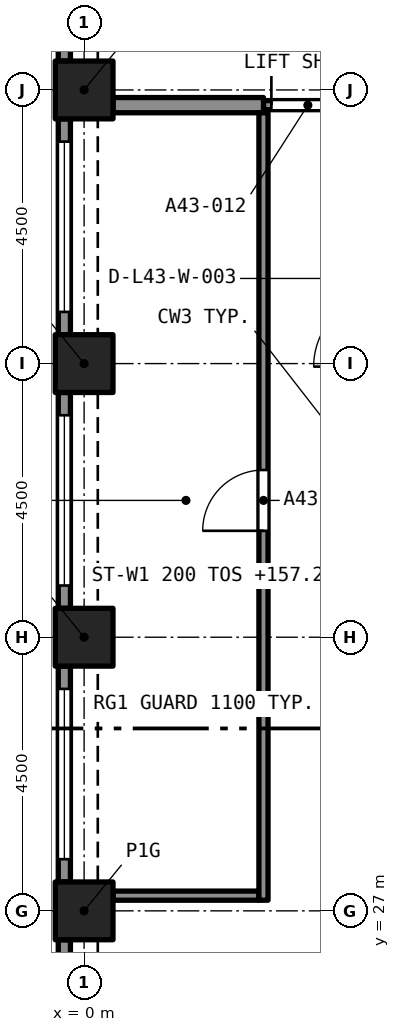
"""IFC4 building model, lengths in metres.
Left out: names, types, materials, properties, quantities, classifications, styles, units other than length and angle.
Written with IfcOpenShell. Run it as: python <this file> out.ifc"""

import sys

from ifc_helpers import new_model, si_unit, direction, frame, frame_2d, origin, origin_2d, place, context, subcontext, project, spatial, rectangle, extrude, element, fill, save


model = new_model("IFC4")
c1 = context("Model", 3, precision=1e-05, world=origin(), true_north=direction((0.0, 1.0)))
c2 = subcontext(c1, "Body", "Model", "MODEL_VIEW")
j1 = project(units=[si_unit("LENGTHUNIT", "METRE"), si_unit("PLANEANGLEUNIT", "RADIAN")], contexts=[c1])
p1 = place(None, origin())
s1 = spatial("IfcSite", under=j1, at=p1, CompositionType="ELEMENT")
p2 = place(p1, origin())
s2 = spatial("IfcBuilding", under=s1, at=p2, CompositionType="ELEMENT")
p3 = place(p2, frame((0.0, 0.0, 155.0)))
s3 = spatial("IfcBuildingStorey", under=s2, at=p3, CompositionType="ELEMENT", Elevation=155.0)
for number, where, z_axis, x_axis in (
    (1, (0.0, 27.0, 0.0), (0.0, 0.0, 1.0), (1.0, 0.0, 0.0)),
    (2, (0.0, 31.5, 0.0), (0.0, 0.0, 1.0), (1.0, 0.0, 0.0)),
    (3, (0.0, 36.0, 0.0), (0.0, 0.0, 1.0), (1.0, 0.0, 0.0)),
    (4, (0.0, 40.5, 0.0), (0.0, 0.0, 1.0), (1.0, 0.0, 0.0)),
):
    element("IfcColumn", number, at=place(p3, frame(where, z_axis=z_axis, x_axis=x_axis)), inside=s3, PredefinedType="COLUMN", context=c2, shape_type="SweptSolid", body=[
        extrude(rectangle(XDim=0.95, YDim=0.95, at=origin_2d()), origin(), (0.0, 0.0, 1.0), 4.4),
    ])
p4 = place(p3, frame((-0.325, 40.975, 0.0), z_axis=(0.0, 0.0, 1.0), x_axis=(0.0, 1.0, 0.0)))
e5 = element("IfcWall", 5, at=p4, inside=s3, PredefinedType="SOLIDWALL", context=c2, shape_type="SweptSolid", body=[
    extrude(rectangle(XDim=3.55, YDim=0.2, at=frame_2d((1.775, 0.0))), origin(), (0.0, 0.0, 1.0), 4.4),
])
p5 = place(p4, frame((0.375, 0.0, 0.45)))
e6 = element("IfcOpeningElement", 6, at=p5, cuts=e5, PredefinedType="OPENING", context=c2, shape_type="SweptSolid", body=[
    extrude(rectangle(XDim=2.8, YDim=2.55, at=frame_2d((1.4, 1.275))), frame((0.0, 0.11, 0.0), z_axis=(0.0, -1.0, 0.0), x_axis=(1.0, 0.0, 0.0)), (0.0, 0.0, 1.0), 0.22),
])
p6 = place(p3, frame((-0.325, 36.475, 0.0), z_axis=(0.0, 0.0, 1.0), x_axis=(0.0, 1.0, 0.0)))
e7 = element("IfcWall", 7, at=p6, inside=s3, PredefinedType="SOLIDWALL", context=c2, shape_type="SweptSolid", body=[
    extrude(rectangle(XDim=3.55, YDim=0.2, at=frame_2d((1.775, 0.0))), origin(), (0.0, 0.0, 1.0), 4.4),
])
p7 = place(p6, frame((0.375, 0.0, 0.45)))
e8 = element("IfcOpeningElement", 8, at=p7, cuts=e7, PredefinedType="OPENING", context=c2, shape_type="SweptSolid", body=[
    extrude(rectangle(XDim=2.8, YDim=2.55, at=frame_2d((1.4, 1.275))), frame((0.0, 0.11, 0.0), z_axis=(0.0, -1.0, 0.0), x_axis=(1.0, 0.0, 0.0)), (0.0, 0.0, 1.0), 0.22),
])
p8 = place(p3, frame((-0.325, 31.975, 0.0), z_axis=(0.0, 0.0, 1.0), x_axis=(0.0, 1.0, 0.0)))
e9 = element("IfcWall", 9, at=p8, inside=s3, PredefinedType="SOLIDWALL", context=c2, shape_type="SweptSolid", body=[
    extrude(rectangle(XDim=3.55, YDim=0.2, at=frame_2d((1.775, 0.0))), origin(), (0.0, 0.0, 1.0), 4.4),
])
p9 = place(p8, frame((0.375, 0.0, 0.45)))
e10 = element("IfcOpeningElement", 10, at=p9, cuts=e9, PredefinedType="OPENING", context=c2, shape_type="SweptSolid", body=[
    extrude(rectangle(XDim=2.8, YDim=2.55, at=frame_2d((1.4, 1.275))), frame((0.0, 0.11, 0.0), z_axis=(0.0, -1.0, 0.0), x_axis=(1.0, 0.0, 0.0)), (0.0, 0.0, 1.0), 0.22),
])
p10 = place(p3, frame((-0.325, 27.475, 0.0), z_axis=(0.0, 0.0, 1.0), x_axis=(0.0, 1.0, 0.0)))
e11 = element("IfcWall", 11, at=p10, inside=s3, PredefinedType="SOLIDWALL", context=c2, shape_type="SweptSolid", body=[
    extrude(rectangle(XDim=3.55, YDim=0.2, at=frame_2d((1.775, 0.0))), origin(), (0.0, 0.0, 1.0), 4.4),
])
p11 = place(p10, frame((0.375, 0.0, 0.45)))
e12 = element("IfcOpeningElement", 12, at=p11, cuts=e11, PredefinedType="OPENING", context=c2, shape_type="SweptSolid", body=[
    extrude(rectangle(XDim=2.8, YDim=2.55, at=frame_2d((1.4, 1.275))), frame((0.0, 0.11, 0.0), z_axis=(0.0, -1.0, 0.0), x_axis=(1.0, 0.0, 0.0)), (0.0, 0.0, 1.0), 0.22),
])
p12 = place(p3, frame((-0.325, 22.975, 0.0), z_axis=(0.0, 0.0, 1.0), x_axis=(0.0, 1.0, 0.0)))
e13 = element("IfcWall", 13, at=p12, inside=s3, PredefinedType="SOLIDWALL", context=c2, shape_type="SweptSolid", body=[
    extrude(rectangle(XDim=3.55, YDim=0.2, at=frame_2d((1.775, 0.0))), origin(), (0.0, 0.0, 1.0), 4.4),
])
p13 = place(p12, frame((0.375, 0.0, 0.45)))
e14 = element("IfcOpeningElement", 14, at=p13, cuts=e13, PredefinedType="OPENING", context=c2, shape_type="SweptSolid", body=[
    extrude(rectangle(XDim=2.8, YDim=2.55, at=frame_2d((1.4, 1.275))), frame((0.0, 0.11, 0.0), z_axis=(0.0, -1.0, 0.0), x_axis=(1.0, 0.0, 0.0)), (0.0, 0.0, 1.0), 0.22),
])
p14 = place(p3, frame((2.95, 40.25, 0.0), z_axis=(0.0, 0.0, 1.0), x_axis=(1.0, 0.0, 0.0)))
e15 = element("IfcWall", 15, at=p14, inside=s3, PredefinedType="PARTITIONING", context=c2, shape_type="SweptSolid", body=[
    extrude(rectangle(XDim=1.8, YDim=0.15, at=frame_2d((0.9, 0.0))), origin(), (0.0, 0.0, 1.0), 4.1),
])
p15 = place(p14, frame((0.13, 0.0, 0.0)))
e16 = element("IfcOpeningElement", 16, at=p15, cuts=e15, PredefinedType="OPENING", context=c2, shape_type="SweptSolid", body=[
    extrude(rectangle(XDim=1.2, YDim=2.4, at=frame_2d((0.6, 1.2))), frame((0.0, 0.085, 0.0), z_axis=(0.0, -1.0, 0.0), x_axis=(1.0, 0.0, 0.0)), (0.0, 0.0, 1.0), 0.17),
])
p16 = place(p3, frame((0.475, 40.25, 0.0), z_axis=(0.0, 0.0, 1.0), x_axis=(1.0, 0.0, 0.0)))
e17 = element("IfcWall", 17, at=p16, inside=s3, PredefinedType="PARTITIONING", context=c2, shape_type="SweptSolid", body=[
    extrude(rectangle(XDim=2.475, YDim=0.25, at=frame_2d((1.237, 0.0))), origin(), (0.0, 0.0, 1.0), 4.1),
])
p17 = place(p3, frame((0.475, 27.25, 0.0), z_axis=(0.0, 0.0, 1.0), x_axis=(1.0, 0.0, 0.0)))
e18 = element("IfcWall", 18, at=p17, inside=s3, PredefinedType="PARTITIONING", context=c2, shape_type="SweptSolid", body=[
    extrude(rectangle(XDim=2.4, YDim=0.15, at=frame_2d((1.2, 0.0))), origin(), (0.0, 0.0, 1.0), 4.1),
])
p18 = place(p3, frame((2.95, 27.175, 0.0), z_axis=(0.0, 0.0, 1.0), x_axis=(0.0, 1.0, 0.0)))
e19 = element("IfcWall", 19, at=p18, inside=s3, PredefinedType="PARTITIONING", context=c2, shape_type="SweptSolid", body=[
    extrude(rectangle(XDim=12.95, YDim=0.15, at=frame_2d((6.475, 0.0))), origin(), (0.0, 0.0, 1.0), 4.1),
])
p19 = place(p18, frame((6.075, 0.0, 0.0)))
e20 = element("IfcOpeningElement", 20, at=p19, cuts=e19, PredefinedType="OPENING", context=c2, shape_type="SweptSolid", body=[
    extrude(rectangle(XDim=1.0, YDim=2.1, at=frame_2d((0.5, 1.05))), frame((0.0, 0.085, 0.0), z_axis=(0.0, -1.0, 0.0), x_axis=(1.0, 0.0, 0.0)), (0.0, 0.0, 1.0), 0.17),
])
p20 = place(p7, origin())
e21 = element("IfcWindow", 21, at=p20, inside=s3, PartitioningType="SINGLE_PANEL", PredefinedType="WINDOW", context=c2, shape_type="SweptSolid", body=[
    extrude(rectangle(XDim=2.8, YDim=2.55, at=frame_2d((1.4, 1.275))), frame((0.0, 0.03, 0.0), z_axis=(0.0, -1.0, 0.0), x_axis=(1.0, 0.0, 0.0)), (0.0, 0.0, 1.0), 0.06),
])
fill(e8, e21)
p21 = place(p9, origin())
e22 = element("IfcWindow", 22, at=p21, inside=s3, PartitioningType="SINGLE_PANEL", PredefinedType="WINDOW", context=c2, shape_type="SweptSolid", body=[
    extrude(rectangle(XDim=2.8, YDim=2.55, at=frame_2d((1.4, 1.275))), frame((0.0, 0.03, 0.0), z_axis=(0.0, -1.0, 0.0), x_axis=(1.0, 0.0, 0.0)), (0.0, 0.0, 1.0), 0.06),
])
fill(e10, e22)
p22 = place(p11, origin())
e23 = element("IfcWindow", 23, at=p22, inside=s3, PartitioningType="SINGLE_PANEL", PredefinedType="WINDOW", context=c2, shape_type="SweptSolid", body=[
    extrude(rectangle(XDim=2.8, YDim=2.55, at=frame_2d((1.4, 1.275))), frame((0.0, 0.03, 0.0), z_axis=(0.0, -1.0, 0.0), x_axis=(1.0, 0.0, 0.0)), (0.0, 0.0, 1.0), 0.06),
])
fill(e12, e23)
p23 = place(p15, origin())
e24 = element("IfcDoor", 24, at=p23, inside=s3, OperationType="SINGLE_SWING_LEFT", PredefinedType="DOOR", context=c2, shape_type="SweptSolid", body=[
    extrude(rectangle(XDim=1.2, YDim=2.4, at=frame_2d((0.6, 1.2))), frame((0.0, 0.025, 0.0), z_axis=(0.0, -1.0, 0.0), x_axis=(1.0, 0.0, 0.0)), (0.0, 0.0, 1.0), 0.05),
])
fill(e16, e24)
p24 = place(p19, origin())
e25 = element("IfcDoor", 25, at=p24, inside=s3, OperationType="SINGLE_SWING_RIGHT", PredefinedType="DOOR", context=c2, shape_type="SweptSolid", body=[
    extrude(rectangle(XDim=1.0, YDim=2.1, at=frame_2d((0.5, 1.05))), frame((0.0, 0.025, 0.0), z_axis=(0.0, -1.0, 0.0), x_axis=(1.0, 0.0, 0.0)), (0.0, 0.0, 1.0), 0.05),
])
fill(e20, e25)
save(model, sys.argv[1])
